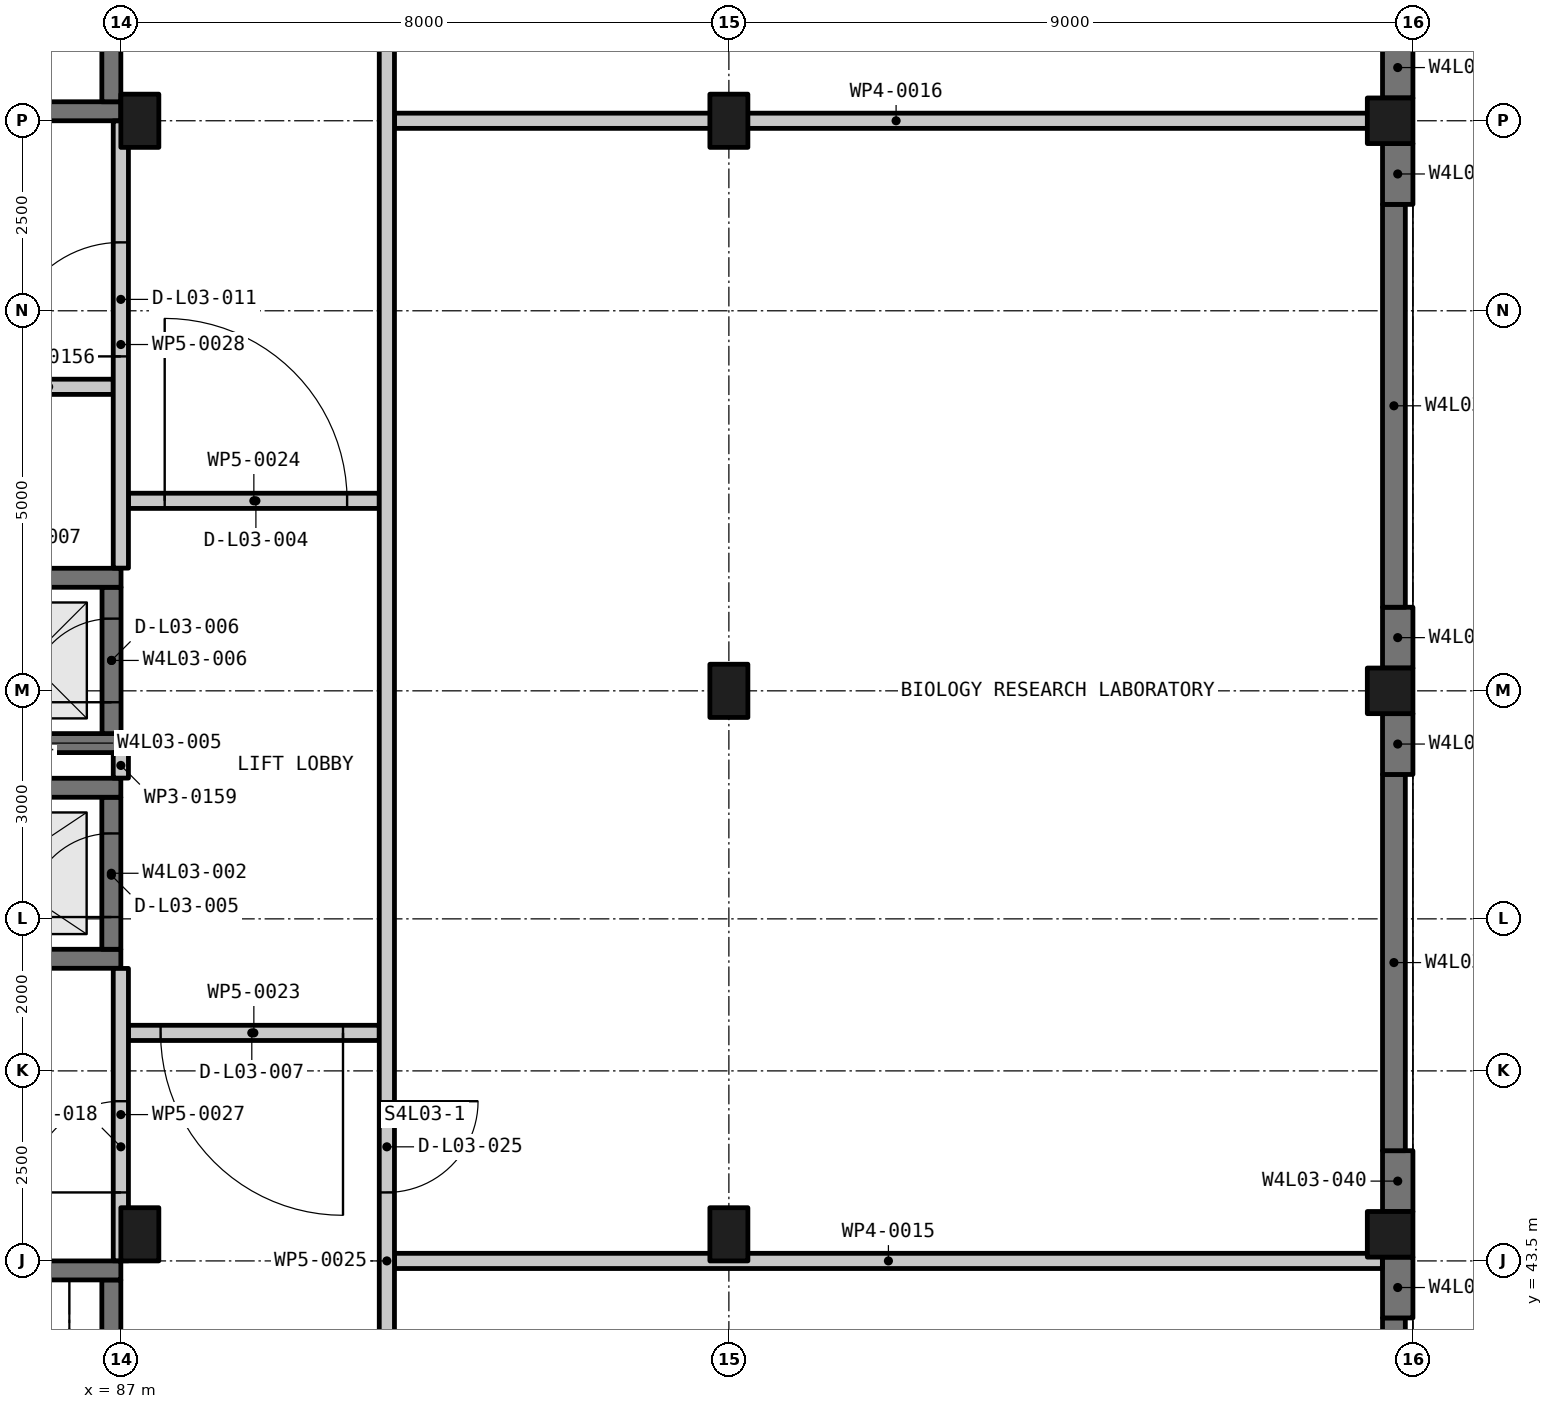
"""IFC4 building model, lengths in metres.
Left out: names, types, materials, properties, quantities, classifications, styles, units other than length and angle.
Written with IfcOpenShell. Run it as: python <this file> out.ifc"""

import sys

from ifc_helpers import new_model, si_unit, direction, frame, frame_2d, origin, origin_2d, place, context, subcontext, project, spatial, rectangle, extrude, element, fill, save


model = new_model("IFC4")
c1 = context("Model", 3, precision=1e-05, world=origin(), true_north=direction((0.0, 1.0)))
c2 = subcontext(c1, "Body", "Model", "MODEL_VIEW")
j1 = project(units=[si_unit("LENGTHUNIT", "METRE"), si_unit("PLANEANGLEUNIT", "RADIAN")], contexts=[c1])
p1 = place(None, origin())
s1 = spatial("IfcSite", under=j1, at=p1, CompositionType="ELEMENT")
p2 = place(p1, origin())
s2 = spatial("IfcBuilding", under=s1, at=p2, CompositionType="ELEMENT")
p3 = place(p2, frame((0.0, 0.0, 15.75)))
s3 = spatial("IfcBuildingStorey", under=s2, at=p3, CompositionType="ELEMENT", Elevation=15.75)
for number, where, z_axis, x_axis in (
    (1, (87.25, 43.85, -0.3), (0.0, 0.0, 1.0), (1.0, 0.0, 0.0)),
    (2, (87.25, 58.5, -0.3), (0.0, 0.0, 1.0), (1.0, 0.0, 0.0)),
    (3, (95.0, 43.85, -0.3), (0.0, 0.0, 1.0), (1.0, 0.0, 0.0)),
    (4, (95.0, 51.0, -0.3), (0.0, 0.0, 1.0), (1.0, 0.0, 0.0)),
    (5, (95.0, 58.5, -0.3), (0.0, 0.0, 1.0), (1.0, 0.0, 0.0)),
):
    element("IfcColumn", number, at=place(p3, frame(where, z_axis=z_axis, x_axis=x_axis)), inside=s3, PredefinedType="COLUMN", context=c2, shape_type="SweptSolid", body=[
        extrude(rectangle(XDim=0.5, YDim=0.7, at=origin_2d()), origin(), (0.0, 0.0, 1.0), 4.5),
    ])
for number, where, z_axis, x_axis in (
    (6, (103.7, 43.85, -0.3), (0.0, 0.0, 1.0), (1.0, 0.0, 0.0)),
    (7, (103.7, 51.0, -0.3), (0.0, 0.0, 1.0), (1.0, 0.0, 0.0)),
    (8, (103.7, 58.5, -0.3), (0.0, 0.0, 1.0), (1.0, 0.0, 0.0)),
):
    element("IfcColumn", number, at=place(p3, frame(where, z_axis=z_axis, x_axis=x_axis)), inside=s3, PredefinedType="COLUMN", context=c2, shape_type="SweptSolid", body=[
        extrude(rectangle(XDim=0.6, YDim=0.6, at=origin_2d()), origin(), (0.0, 0.0, 1.0), 4.5),
    ])
p4 = place(p3, frame((83.7, 47.475, -0.3), z_axis=(0.0, 0.0, 1.0), x_axis=(1.0, 0.0, 0.0)))
e9 = element("IfcWall", 9, at=p4, inside=s3, PredefinedType="SHEAR", context=c2, shape_type="SweptSolid", body=[
    extrude(rectangle(XDim=3.3, YDim=0.25, at=frame_2d((1.65, 0.0))), origin(), (0.0, 0.0, 1.0), 4.5),
])
p5 = place(p3, frame((86.875, 47.6, -0.3), z_axis=(0.0, 0.0, 1.0), x_axis=(0.0, 1.0, 0.0)))
e10 = element("IfcWall", 10, at=p5, inside=s3, PredefinedType="SHEAR", context=c2, shape_type="SweptSolid", body=[
    extrude(rectangle(XDim=2.0, YDim=0.25, at=frame_2d((1.0, 0.0))), origin(), (0.0, 0.0, 1.0), 4.5),
])
p6 = place(p5, frame((0.424, 0.0, 0.3)))
e11 = element("IfcOpeningElement", 11, at=p6, cuts=e10, PredefinedType="OPENING", context=c2, shape_type="SweptSolid", body=[
    extrude(rectangle(XDim=1.1, YDim=2.1, at=frame_2d((0.55, 1.05))), frame((0.0, 0.135, 0.0), z_axis=(0.0, -1.0, 0.0), x_axis=(1.0, 0.0, 0.0)), (0.0, 0.0, 1.0), 0.27),
])
p7 = place(p3, frame((83.7, 49.725, -0.3), z_axis=(0.0, 0.0, 1.0), x_axis=(1.0, 0.0, 0.0)))
e12 = element("IfcWall", 12, at=p7, inside=s3, PredefinedType="SHEAR", context=c2, shape_type="SweptSolid", body=[
    extrude(rectangle(XDim=3.3, YDim=0.25, at=frame_2d((1.65, 0.0))), origin(), (0.0, 0.0, 1.0), 4.5),
])
p8 = place(p3, frame((84.577, 50.312, -0.3), z_axis=(0.0, 0.0, 1.0), x_axis=(1.0, 0.0, 0.0)))
e13 = element("IfcWall", 13, at=p8, inside=s3, PredefinedType="SHEAR", context=c2, shape_type="SweptSolid", body=[
    extrude(rectangle(XDim=2.425, YDim=0.25, at=frame_2d((1.212, 0.0))), origin(), (0.0, 0.0, 1.0), 4.5),
])
p9 = place(p3, frame((86.877, 50.438, -0.3), z_axis=(0.0, 0.0, 1.0), x_axis=(0.0, 1.0, 0.0)))
e14 = element("IfcWall", 14, at=p9, inside=s3, PredefinedType="SHEAR", context=c2, shape_type="SweptSolid", body=[
    extrude(rectangle(XDim=1.925, YDim=0.25, at=frame_2d((0.962, 0.0))), origin(), (0.0, 0.0, 1.0), 4.5),
])
p10 = place(p9, frame((0.413, 0.0, 0.3)))
e15 = element("IfcOpeningElement", 15, at=p10, cuts=e14, PredefinedType="OPENING", context=c2, shape_type="SweptSolid", body=[
    extrude(rectangle(XDim=1.1, YDim=2.1, at=frame_2d((0.55, 1.05))), frame((0.0, 0.135, 0.0), z_axis=(0.0, -1.0, 0.0), x_axis=(1.0, 0.0, 0.0)), (0.0, 0.0, 1.0), 0.27),
])
p11 = place(p3, frame((84.577, 52.488, -0.3), z_axis=(0.0, 0.0, 1.0), x_axis=(1.0, 0.0, 0.0)))
e16 = element("IfcWall", 16, at=p11, inside=s3, PredefinedType="SHEAR", context=c2, shape_type="SweptSolid", body=[
    extrude(rectangle(XDim=2.425, YDim=0.25, at=frame_2d((1.212, 0.0))), origin(), (0.0, 0.0, 1.0), 4.5),
])
p12 = place(p3, frame((86.875, 36.25, -0.3), z_axis=(0.0, 0.0, 1.0), x_axis=(0.0, 1.0, 0.0)))
e17 = element("IfcWall", 17, at=p12, inside=s3, PredefinedType="SHEAR", context=c2, shape_type="SweptSolid", body=[
    extrude(rectangle(XDim=7.0, YDim=0.25, at=frame_2d((3.5, 0.0))), origin(), (0.0, 0.0, 1.0), 4.5),
])
p13 = place(p3, frame((82.0, 43.375, -0.3), z_axis=(0.0, 0.0, 1.0), x_axis=(1.0, 0.0, 0.0)))
e18 = element("IfcWall", 18, at=p13, inside=s3, PredefinedType="SHEAR", context=c2, shape_type="SweptSolid", body=[
    extrude(rectangle(XDim=5.0, YDim=0.25, at=frame_2d((2.5, 0.0))), origin(), (0.0, 0.0, 1.0), 4.5),
])
p14 = place(p3, frame((82.0, 58.625, -0.3), z_axis=(0.0, 0.0, 1.0), x_axis=(1.0, 0.0, 0.0)))
e19 = element("IfcWall", 19, at=p14, inside=s3, PredefinedType="SHEAR", context=c2, shape_type="SweptSolid", body=[
    extrude(rectangle(XDim=5.0, YDim=0.25, at=frame_2d((2.5, 0.0))), origin(), (0.0, 0.0, 1.0), 4.5),
])
p15 = place(p14, frame((1.9, 0.0, 0.3)))
e20 = element("IfcOpeningElement", 20, at=p15, cuts=e19, PredefinedType="OPENING", context=c2, shape_type="SweptSolid", body=[
    extrude(rectangle(XDim=1.2, YDim=2.2, at=frame_2d((0.6, 1.1))), frame((0.0, 0.135, 0.0), z_axis=(0.0, -1.0, 0.0), x_axis=(1.0, 0.0, 0.0)), (0.0, 0.0, 1.0), 0.27),
])
p16 = place(p3, frame((86.875, 58.75, -0.3), z_axis=(0.0, 0.0, 1.0), x_axis=(0.0, 1.0, 0.0)))
e21 = element("IfcWall", 21, at=p16, inside=s3, PredefinedType="SHEAR", context=c2, shape_type="SweptSolid", body=[
    extrude(rectangle(XDim=7.0, YDim=0.25, at=frame_2d((3.5, 0.0))), origin(), (0.0, 0.0, 1.0), 4.5),
])
p17 = place(p3, frame((103.75, 37.1, -0.3), z_axis=(0.0, 0.0, 1.0), x_axis=(0.0, 1.0, 0.0)))
e22 = element("IfcWall", 22, at=p17, inside=s3, PredefinedType="SOLIDWALL", context=c2, shape_type="SweptSolid", body=[
    extrude(rectangle(XDim=5.65, YDim=0.3, at=frame_2d((2.825, 0.0))), origin(), (0.0, 0.0, 1.0), 4.5),
])
for number, where, z_axis, x_axis in (
    (23, (103.8, 42.75, -0.3), (0.0, 0.0, 1.0), (0.0, 1.0, 0.0)),
    (24, (103.8, 44.15, -0.3), (0.0, 0.0, 1.0), (0.0, 1.0, 0.0)),
):
    element("IfcWall", number, at=place(p3, frame(where, z_axis=z_axis, x_axis=x_axis)), inside=s3, PredefinedType="SOLIDWALL", context=c2, shape_type="SweptSolid", body=[
        extrude(rectangle(XDim=0.8, YDim=0.4, at=frame_2d((0.4, 0.0))), origin(), (0.0, 0.0, 1.0), 4.5),
    ])
p18 = place(p3, frame((103.75, 44.95, -0.3), z_axis=(0.0, 0.0, 1.0), x_axis=(0.0, 1.0, 0.0)))
e25 = element("IfcWall", 25, at=p18, inside=s3, PredefinedType="SOLIDWALL", context=c2, shape_type="SweptSolid", body=[
    extrude(rectangle(XDim=4.95, YDim=0.3, at=frame_2d((2.475, 0.0))), origin(), (0.0, 0.0, 1.0), 4.5),
])
for number, where, z_axis, x_axis in (
    (26, (103.8, 49.9, -0.3), (0.0, 0.0, 1.0), (0.0, 1.0, 0.0)),
    (27, (103.8, 51.3, -0.3), (0.0, 0.0, 1.0), (0.0, 1.0, 0.0)),
):
    element("IfcWall", number, at=place(p3, frame(where, z_axis=z_axis, x_axis=x_axis)), inside=s3, PredefinedType="SOLIDWALL", context=c2, shape_type="SweptSolid", body=[
        extrude(rectangle(XDim=0.8, YDim=0.4, at=frame_2d((0.4, 0.0))), origin(), (0.0, 0.0, 1.0), 4.5),
    ])
p19 = place(p3, frame((103.75, 52.1, -0.3), z_axis=(0.0, 0.0, 1.0), x_axis=(0.0, 1.0, 0.0)))
e28 = element("IfcWall", 28, at=p19, inside=s3, PredefinedType="SOLIDWALL", context=c2, shape_type="SweptSolid", body=[
    extrude(rectangle(XDim=5.3, YDim=0.3, at=frame_2d((2.65, 0.0))), origin(), (0.0, 0.0, 1.0), 4.5),
])
for number, where, z_axis, x_axis in (
    (29, (103.8, 57.4, -0.3), (0.0, 0.0, 1.0), (0.0, 1.0, 0.0)),
    (30, (103.8, 58.8, -0.3), (0.0, 0.0, 1.0), (0.0, 1.0, 0.0)),
):
    element("IfcWall", number, at=place(p3, frame(where, z_axis=z_axis, x_axis=x_axis)), inside=s3, PredefinedType="SOLIDWALL", context=c2, shape_type="SweptSolid", body=[
        extrude(rectangle(XDim=0.8, YDim=0.4, at=frame_2d((0.4, 0.0))), origin(), (0.0, 0.0, 1.0), 4.5),
    ])
p20 = place(p3, frame((90.6, 43.5, 0.0), z_axis=(0.0, 0.0, 1.0), x_axis=(1.0, 0.0, 0.0)))
e31 = element("IfcWall", 31, at=p20, inside=s3, PredefinedType="PARTITIONING", context=c2, shape_type="SweptSolid", body=[
    extrude(rectangle(XDim=12.998, YDim=0.2, at=frame_2d((6.499, 0.0))), origin(), (0.0, 0.0, 1.0), 3.4),
])
p21 = place(p3, frame((90.4, 46.5, 0.0), z_axis=(0.0, 0.0, 1.0), x_axis=(-1.0, 0.0, 0.0)))
e32 = element("IfcWall", 32, at=p21, inside=s3, PredefinedType="PARTITIONING", context=c2, shape_type="SweptSolid", body=[
    extrude(rectangle(XDim=3.3, YDim=0.2, at=frame_2d((1.65, 0.0))), origin(), (0.0, 0.0, 1.0), 3.4),
])
p22 = place(p21, frame((0.477, 0.0, 0.0)))
e33 = element("IfcOpeningElement", 33, at=p22, cuts=e32, PredefinedType="OPENING", context=c2, shape_type="SweptSolid", body=[
    extrude(rectangle(XDim=2.4, YDim=2.1, at=frame_2d((1.2, 1.05))), frame((0.0, 0.11, 0.0), z_axis=(0.0, -1.0, 0.0), x_axis=(1.0, 0.0, 0.0)), (0.0, 0.0, 1.0), 0.22),
])
p23 = place(p3, frame((87.1, 53.5, 0.0), z_axis=(0.0, 0.0, 1.0), x_axis=(1.0, 0.0, 0.0)))
e34 = element("IfcWall", 34, at=p23, inside=s3, PredefinedType="PARTITIONING", context=c2, shape_type="SweptSolid", body=[
    extrude(rectangle(XDim=3.3, YDim=0.2, at=frame_2d((1.65, 0.0))), origin(), (0.0, 0.0, 1.0), 3.4),
])
p24 = place(p23, frame((0.477, 0.0, 0.0)))
e35 = element("IfcOpeningElement", 35, at=p24, cuts=e34, PredefinedType="OPENING", context=c2, shape_type="SweptSolid", body=[
    extrude(rectangle(XDim=2.4, YDim=2.1, at=frame_2d((1.2, 1.05))), frame((0.0, 0.11, 0.0), z_axis=(0.0, -1.0, 0.0), x_axis=(1.0, 0.0, 0.0)), (0.0, 0.0, 1.0), 0.22),
])
p25 = place(p3, frame((85.2, 55.0, 0.0), z_axis=(0.0, 0.0, 1.0), x_axis=(1.0, 0.0, 0.0)))
e36 = element("IfcWall", 36, at=p25, inside=s3, PredefinedType="PARTITIONING", context=c2, shape_type="SweptSolid", body=[
    extrude(rectangle(XDim=1.7, YDim=0.2, at=frame_2d((0.85, 0.0))), origin(), (0.0, 0.0, 1.0), 3.6),
])
p26 = place(p3, frame((90.6, 58.5, 0.0), z_axis=(0.0, 0.0, 1.0), x_axis=(1.0, 0.0, 0.0)))
e37 = element("IfcWall", 37, at=p26, inside=s3, PredefinedType="PARTITIONING", context=c2, shape_type="SweptSolid", body=[
    extrude(rectangle(XDim=13.2, YDim=0.2, at=frame_2d((6.6, 0.0))), origin(), (0.0, 0.0, 1.0), 3.3),
])
p27 = place(p3, frame((90.5, 80.8, 0.0), z_axis=(0.0, 0.0, 1.0), x_axis=(0.0, -1.0, 0.0)))
e38 = element("IfcWall", 38, at=p27, inside=s3, PredefinedType="PARTITIONING", context=c2, shape_type="SweptSolid", body=[
    extrude(rectangle(XDim=74.6, YDim=0.2, at=frame_2d((37.3, 0.0))), origin(), (0.0, 0.0, 1.0), 3.3),
])
p28 = place(p27, frame((70.35, 0.0, 0.0)))
e39 = element("IfcOpeningElement", 39, at=p28, cuts=e38, PredefinedType="OPENING", context=c2, shape_type="SweptSolid", body=[
    extrude(rectangle(XDim=1.2, YDim=2.1, at=frame_2d((0.6, 1.05))), frame((0.0, 0.11, 0.0), z_axis=(0.0, -1.0, 0.0), x_axis=(1.0, 0.0, 0.0)), (0.0, 0.0, 1.0), 0.22),
])
p29 = place(p27, frame((59.2, 0.0, 0.0)))
e40 = element("IfcOpeningElement", 40, at=p29, cuts=e38, PredefinedType="OPENING", context=c2, shape_type="SweptSolid", body=[
    extrude(rectangle(XDim=1.2, YDim=2.1, at=frame_2d((0.6, 1.05))), frame((0.0, 0.11, 0.0), z_axis=(0.0, -1.0, 0.0), x_axis=(1.0, 0.0, 0.0)), (0.0, 0.0, 1.0), 0.22),
])
p30 = place(p27, frame((44.2, 0.0, 0.0)))
e41 = element("IfcOpeningElement", 41, at=p30, cuts=e38, PredefinedType="OPENING", context=c2, shape_type="SweptSolid", body=[
    extrude(rectangle(XDim=1.2, YDim=2.1, at=frame_2d((0.6, 1.05))), frame((0.0, 0.11, 0.0), z_axis=(0.0, -1.0, 0.0), x_axis=(1.0, 0.0, 0.0)), (0.0, 0.0, 1.0), 0.22),
])
p31 = place(p27, frame((35.199, 0.0, 0.0)))
e42 = element("IfcOpeningElement", 42, at=p31, cuts=e38, PredefinedType="OPENING", context=c2, shape_type="SweptSolid", body=[
    extrude(rectangle(XDim=1.2, YDim=2.1, at=frame_2d((0.6, 1.05))), frame((0.0, 0.11, 0.0), z_axis=(0.0, -1.0, 0.0), x_axis=(1.0, 0.0, 0.0)), (0.0, 0.0, 1.0), 0.22),
])
p32 = place(p27, frame((14.2, 0.0, 0.0)))
e43 = element("IfcOpeningElement", 43, at=p32, cuts=e38, PredefinedType="OPENING", context=c2, shape_type="SweptSolid", body=[
    extrude(rectangle(XDim=1.2, YDim=2.1, at=frame_2d((0.6, 1.05))), frame((0.0, 0.11, 0.0), z_axis=(0.0, -1.0, 0.0), x_axis=(1.0, 0.0, 0.0)), (0.0, 0.0, 1.0), 0.22),
])
p33 = place(p27, frame((3.075, 0.0, 0.0)))
e44 = element("IfcOpeningElement", 44, at=p33, cuts=e38, PredefinedType="OPENING", context=c2, shape_type="SweptSolid", body=[
    extrude(rectangle(XDim=1.2, YDim=2.1, at=frame_2d((0.6, 1.05))), frame((0.0, 0.11, 0.0), z_axis=(0.0, -1.0, 0.0), x_axis=(1.0, 0.0, 0.0)), (0.0, 0.0, 1.0), 0.22),
])
p34 = place(p3, frame((87.0, 43.502, 0.0), z_axis=(0.0, 0.0, 1.0), x_axis=(0.0, 1.0, 0.0)))
e45 = element("IfcWall", 45, at=p34, inside=s3, PredefinedType="PARTITIONING", context=c2, shape_type="SweptSolid", body=[
    extrude(rectangle(XDim=3.846, YDim=0.2, at=frame_2d((1.923, 0.0))), origin(), (0.0, 0.0, 1.0), 3.4),
])
p35 = place(p34, frame((0.899, 0.0, 0.0)))
e46 = element("IfcOpeningElement", 46, at=p35, cuts=e45, PredefinedType="OPENING", context=c2, shape_type="SweptSolid", body=[
    extrude(rectangle(XDim=1.2, YDim=2.1, at=frame_2d((0.6, 1.05))), frame((0.0, 0.11, 0.0), z_axis=(0.0, -1.0, 0.0), x_axis=(1.0, 0.0, 0.0)), (0.0, 0.0, 1.0), 0.22),
])
p36 = place(p3, frame((87.0, 49.852, 0.0), z_axis=(0.0, 0.0, 1.0), x_axis=(0.0, 1.0, 0.0)))
e47 = element("IfcWall", 47, at=p36, inside=s3, PredefinedType="PARTITIONING", context=c2, shape_type="SweptSolid", body=[
    extrude(rectangle(XDim=0.333, YDim=0.2, at=frame_2d((0.167, 0.0))), origin(), (0.0, 0.0, 1.0), 3.4),
])
p37 = place(p3, frame((87.0, 52.615, 0.0), z_axis=(0.0, 0.0, 1.0), x_axis=(0.0, 1.0, 0.0)))
e48 = element("IfcWall", 48, at=p37, inside=s3, PredefinedType="PARTITIONING", context=c2, shape_type="SweptSolid", body=[
    extrude(rectangle(XDim=5.884, YDim=0.2, at=frame_2d((2.942, 0.0))), origin(), (0.0, 0.0, 1.0), 3.4),
])
p38 = place(p37, frame((2.785, 0.0, 0.0)))
e49 = element("IfcOpeningElement", 49, at=p38, cuts=e48, PredefinedType="OPENING", context=c2, shape_type="SweptSolid", body=[
    extrude(rectangle(XDim=1.5, YDim=2.1, at=frame_2d((0.75, 1.05))), frame((0.0, 0.11, 0.0), z_axis=(0.0, -1.0, 0.0), x_axis=(1.0, 0.0, 0.0)), (0.0, 0.0, 1.0), 0.22),
])
p39 = place(p24, origin())
e50 = element("IfcDoor", 50, at=p39, inside=s3, OperationType="DOUBLE_DOOR_SINGLE_SWING", PredefinedType="DOOR", context=c2, shape_type="SweptSolid", body=[
    extrude(rectangle(XDim=2.4, YDim=2.1, at=frame_2d((1.2, 1.05))), frame((0.0, 0.025, 0.0), z_axis=(0.0, -1.0, 0.0), x_axis=(1.0, 0.0, 0.0)), (0.0, 0.0, 1.0), 0.05),
])
fill(e35, e50)
p40 = place(p6, origin())
e51 = element("IfcDoor", 51, at=p40, inside=s3, OperationType="DOUBLE_DOOR_SLIDING", PredefinedType="DOOR", context=c2, shape_type="SweptSolid", body=[
    extrude(rectangle(XDim=1.1, YDim=2.1, at=frame_2d((0.55, 1.05))), frame((0.0, 0.025, 0.0), z_axis=(0.0, -1.0, 0.0), x_axis=(1.0, 0.0, 0.0)), (0.0, 0.0, 1.0), 0.05),
])
fill(e11, e51)
p41 = place(p10, origin())
e52 = element("IfcDoor", 52, at=p41, inside=s3, OperationType="DOUBLE_DOOR_SLIDING", PredefinedType="DOOR", context=c2, shape_type="SweptSolid", body=[
    extrude(rectangle(XDim=1.1, YDim=2.1, at=frame_2d((0.55, 1.05))), frame((0.0, 0.025, 0.0), z_axis=(0.0, -1.0, 0.0), x_axis=(1.0, 0.0, 0.0)), (0.0, 0.0, 1.0), 0.05),
])
fill(e15, e52)
p42 = place(p22, origin())
e53 = element("IfcDoor", 53, at=p42, inside=s3, OperationType="DOUBLE_DOOR_SINGLE_SWING", PredefinedType="DOOR", context=c2, shape_type="SweptSolid", body=[
    extrude(rectangle(XDim=2.4, YDim=2.1, at=frame_2d((1.2, 1.05))), frame((0.0, 0.025, 0.0), z_axis=(0.0, -1.0, 0.0), x_axis=(1.0, 0.0, 0.0)), (0.0, 0.0, 1.0), 0.05),
])
fill(e33, e53)
p43 = place(p38, origin())
e54 = element("IfcDoor", 54, at=p43, inside=s3, OperationType="DOUBLE_DOOR_SINGLE_SWING", PredefinedType="DOOR", context=c2, shape_type="SweptSolid", body=[
    extrude(rectangle(XDim=1.5, YDim=2.1, at=frame_2d((0.75, 1.05))), frame((0.0, 0.025, 0.0), z_axis=(0.0, -1.0, 0.0), x_axis=(1.0, 0.0, 0.0)), (0.0, 0.0, 1.0), 0.05),
])
fill(e49, e54)
p44 = place(p35, origin())
e55 = element("IfcDoor", 55, at=p44, inside=s3, OperationType="SINGLE_SWING_RIGHT", PredefinedType="DOOR", context=c2, shape_type="SweptSolid", body=[
    extrude(rectangle(XDim=1.2, YDim=2.1, at=frame_2d((0.6, 1.05))), frame((0.0, 0.025, 0.0), z_axis=(0.0, -1.0, 0.0), x_axis=(1.0, 0.0, 0.0)), (0.0, 0.0, 1.0), 0.05),
])
fill(e46, e55)
p45 = place(p31, origin())
e56 = element("IfcDoor", 56, at=p45, inside=s3, OperationType="SINGLE_SWING_RIGHT", PredefinedType="DOOR", context=c2, shape_type="SweptSolid", body=[
    extrude(rectangle(XDim=1.2, YDim=2.1, at=frame_2d((0.6, 1.05))), frame((0.0, 0.025, 0.0), z_axis=(0.0, -1.0, 0.0), x_axis=(1.0, 0.0, 0.0)), (0.0, 0.0, 1.0), 0.05),
])
fill(e42, e56)
save(model, sys.argv[1])
